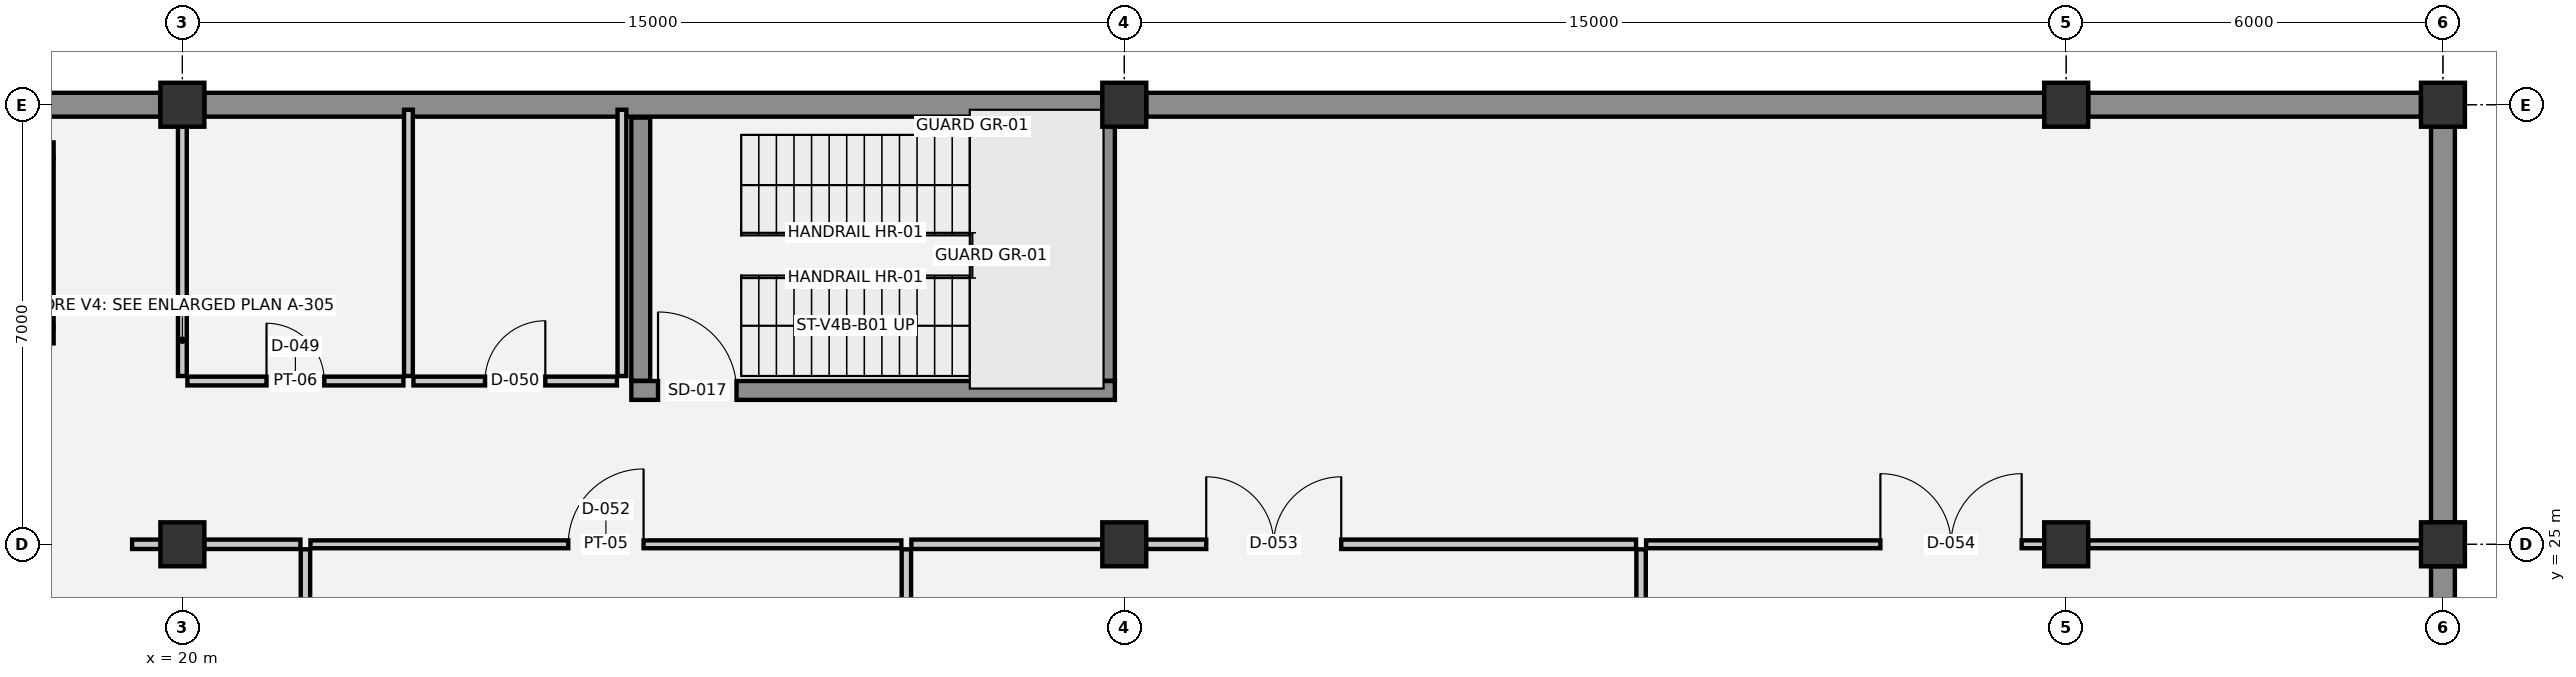
"""IFC4 building model, lengths in metres.
Left out: names, types, materials, properties, quantities, classifications, styles, units other than length and angle.
Written with IfcOpenShell. Run it as: python <this file> out.ifc"""

import sys

from ifc_helpers import new_model, si_unit, direction, frame, frame_2d, origin, origin_2d, place, context, subcontext, project, spatial, rectangle, extrude, element, fill, save


model = new_model("IFC4")
c1 = context("Model", 3, precision=1e-05, world=origin(), true_north=direction((0.0, 1.0)))
c2 = subcontext(c1, "Body", "Model", "MODEL_VIEW")
j1 = project(units=[si_unit("LENGTHUNIT", "METRE"), si_unit("PLANEANGLEUNIT", "RADIAN")], contexts=[c1])
p1 = place(None, origin())
s1 = spatial("IfcSite", under=j1, at=p1, CompositionType="ELEMENT")
p2 = place(p1, origin())
s2 = spatial("IfcBuilding", under=s1, at=p2, CompositionType="ELEMENT")
p3 = place(p2, frame((0.0, 0.0, -4.5)))
s3 = spatial("IfcBuildingStorey", under=s2, at=p3, CompositionType="ELEMENT", Elevation=-4.5)
for number, where, z_axis, x_axis in (
    (1, (20.0, 25.0, 0.0), (0.0, 0.0, 1.0), (1.0, 0.0, 0.0)),
    (2, (20.0, 32.0, 0.0), (0.0, 0.0, 1.0), (1.0, 0.0, 0.0)),
    (3, (35.0, 25.0, 0.0), (0.0, 0.0, 1.0), (1.0, 0.0, 0.0)),
    (4, (35.0, 32.0, 0.0), (0.0, 0.0, 1.0), (1.0, 0.0, 0.0)),
    (5, (50.0, 25.0, 0.0), (0.0, 0.0, 1.0), (1.0, 0.0, 0.0)),
    (6, (50.0, 32.0, 0.0), (0.0, 0.0, 1.0), (1.0, 0.0, 0.0)),
    (7, (56.0, 25.0, 0.0), (0.0, 0.0, 1.0), (1.0, 0.0, 0.0)),
    (8, (56.0, 32.0, 0.0), (0.0, 0.0, 1.0), (1.0, 0.0, 0.0)),
):
    element("IfcColumn", number, at=place(p3, frame(where, z_axis=z_axis, x_axis=x_axis)), inside=s3, PredefinedType="COLUMN", context=c2, shape_type="SweptSolid", body=[
        extrude(rectangle(XDim=0.7, YDim=0.7, at=origin_2d()), origin(), (0.0, 0.0, 1.0), 4.5),
    ])
p4 = place(p3, frame((14.85, 32.0, 0.0), z_axis=(0.0, 0.0, 1.0), x_axis=(1.0, 0.0, 0.0)))
e9 = element("IfcWall", 9, at=p4, inside=s3, PredefinedType="STANDARD", context=c2, shape_type="SweptSolid", body=[
    extrude(rectangle(XDim=4.8, YDim=0.38, at=frame_2d((2.4, 0.0))), origin(), (0.0, 0.0, 1.0), 4.24),
])
for number, where, z_axis, x_axis in (
    (10, (20.35, 32.0, 0.0), (0.0, 0.0, 1.0), (1.0, 0.0, 0.0)),
    (11, (35.35, 32.0, 0.0), (0.0, 0.0, 1.0), (1.0, 0.0, 0.0)),
):
    element("IfcWall", number, at=place(p3, frame(where, z_axis=z_axis, x_axis=x_axis)), inside=s3, PredefinedType="STANDARD", context=c2, shape_type="SweptSolid", body=[
        extrude(rectangle(XDim=14.3, YDim=0.38, at=frame_2d((7.15, 0.0))), origin(), (0.0, 0.0, 1.0), 4.24),
    ])
p5 = place(p3, frame((50.35, 32.0, 0.0), z_axis=(0.0, 0.0, 1.0), x_axis=(1.0, 0.0, 0.0)))
e12 = element("IfcWall", 12, at=p5, inside=s3, PredefinedType="STANDARD", context=c2, shape_type="SweptSolid", body=[
    extrude(rectangle(XDim=5.3, YDim=0.38, at=frame_2d((2.65, 0.0))), origin(), (0.0, 0.0, 1.0), 4.24),
])
p6 = place(p3, frame((56.0, 31.65, 0.0), z_axis=(0.0, 0.0, 1.0), x_axis=(0.0, -1.0, 0.0)))
e13 = element("IfcWall", 13, at=p6, inside=s3, PredefinedType="STANDARD", context=c2, shape_type="SweptSolid", body=[
    extrude(rectangle(XDim=6.3, YDim=0.38, at=frame_2d((3.15, 0.0))), origin(), (0.0, 0.0, 1.0), 4.24),
])
p7 = place(p3, frame((56.0, 24.65, 0.0), z_axis=(0.0, 0.0, 1.0), x_axis=(0.0, -1.0, 0.0)))
e14 = element("IfcWall", 14, at=p7, inside=s3, PredefinedType="STANDARD", context=c2, shape_type="SweptSolid", body=[
    extrude(rectangle(XDim=7.3, YDim=0.38, at=frame_2d((3.65, 0.0))), origin(), (0.0, 0.0, 1.0), 4.24),
])
p8 = place(p3, frame((15.05, 28.325, 0.0), z_axis=(0.0, 0.0, 1.0), x_axis=(1.0, 0.0, 0.0)))
e15 = element("IfcWall", 15, at=p8, inside=s3, PredefinedType="SHEAR", context=c2, shape_type="SweptSolid", body=[
    extrude(rectangle(XDim=2.9, YDim=0.25, at=frame_2d((1.45, 0.0))), origin(), (0.0, 0.0, 1.0), 4.5),
])
p9 = place(p8, frame((0.9, 0.0, 0.0)))
e16 = element("IfcOpeningElement", 16, at=p9, cuts=e15, PredefinedType="OPENING", context=c2, shape_type="SweptSolid", body=[
    extrude(rectangle(XDim=1.1, YDim=2.15, at=frame_2d((0.55, 1.075))), frame((0.0, 0.135, 0.0), z_axis=(0.0, -1.0, 0.0), x_axis=(1.0, 0.0, 0.0)), (0.0, 0.0, 1.0), 0.27),
])
p10 = place(p3, frame((17.95, 31.275, 0.0), z_axis=(0.0, 0.0, 1.0), x_axis=(-1.0, 0.0, 0.0)))
e17 = element("IfcWall", 17, at=p10, inside=s3, PredefinedType="SHEAR", context=c2, shape_type="SweptSolid", body=[
    extrude(rectangle(XDim=2.9, YDim=0.25, at=frame_2d((1.45, 0.0))), origin(), (0.0, 0.0, 1.0), 4.5),
])
p11 = place(p3, frame((17.825, 28.455, 0.0), z_axis=(0.0, 0.0, 1.0), x_axis=(0.0, 1.0, 0.0)))
e18 = element("IfcWall", 18, at=p11, inside=s3, PredefinedType="SHEAR", context=c2, shape_type="SweptSolid", body=[
    extrude(rectangle(XDim=2.69, YDim=0.25, at=frame_2d((1.345, 0.0))), origin(), (0.0, 0.0, 1.0), 4.5),
])
p12 = place(p3, frame((27.15, 27.45, 0.0), z_axis=(0.0, 0.0, 1.0), x_axis=(1.0, 0.0, 0.0)))
e19 = element("IfcWall", 19, at=p12, inside=s3, PredefinedType="SHEAR", context=c2, shape_type="SweptSolid", body=[
    extrude(rectangle(XDim=7.7, YDim=0.3, at=frame_2d((3.85, 0.0))), origin(), (0.0, 0.0, 1.0), 4.24),
])
p13 = place(p12, frame((0.425, 0.0, 0.0)))
e20 = element("IfcOpeningElement", 20, at=p13, cuts=e19, PredefinedType="OPENING", context=c2, shape_type="SweptSolid", body=[
    extrude(rectangle(XDim=1.25, YDim=2.15, at=frame_2d((0.625, 1.075))), frame((0.0, 0.16, 0.0), z_axis=(0.0, -1.0, 0.0), x_axis=(1.0, 0.0, 0.0)), (0.0, 0.0, 1.0), 0.32),
])
for number, where, z_axis, x_axis in (
    (21, (27.3, 31.795, 0.0), (0.0, 0.0, 1.0), (0.0, -1.0, 0.0)),
    (22, (34.7, 27.605, 0.0), (0.0, 0.0, 1.0), (0.0, 1.0, 0.0)),
):
    element("IfcWall", number, at=place(p3, frame(where, z_axis=z_axis, x_axis=x_axis)), inside=s3, PredefinedType="SHEAR", context=c2, shape_type="SweptSolid", body=[
        extrude(rectangle(XDim=4.19, YDim=0.3, at=frame_2d((2.095, 0.0))), origin(), (0.0, 0.0, 1.0), 4.24),
    ])
p14 = place(p3, frame((19.2, 25.0, 0.0), z_axis=(0.0, 0.0, 1.0), x_axis=(1.0, 0.0, 0.0)))
e23 = element("IfcWall", 23, at=p14, inside=s3, PredefinedType="PARTITIONING", context=c2, shape_type="SweptSolid", body=[
    extrude(rectangle(XDim=1.15, YDim=0.15, at=frame_2d((0.575, 0.0))), origin(), (0.0, 0.0, 1.0), 4.14),
])
p15 = place(p3, frame((20.35, 25.0, 0.0), z_axis=(0.0, 0.0, 1.0), x_axis=(1.0, 0.0, 0.0)))
e24 = element("IfcWall", 24, at=p15, inside=s3, PredefinedType="PARTITIONING", context=c2, shape_type="SweptSolid", body=[
    extrude(rectangle(XDim=1.53, YDim=0.15, at=frame_2d((0.765, 0.0))), origin(), (0.0, 0.0, 1.0), 3.28),
])
p16 = place(p3, frame((22.04, 25.0, 0.0), z_axis=(0.0, 0.0, 1.0), x_axis=(1.0, 0.0, 0.0)))
e25 = element("IfcWall", 25, at=p16, inside=s3, PredefinedType="PARTITIONING", context=c2, shape_type="SweptSolid", body=[
    extrude(rectangle(XDim=9.41, YDim=0.125, at=frame_2d((4.705, 0.0))), origin(), (0.0, 0.0, 1.0), 3.28),
])
p17 = place(p16, frame((4.105, 0.0, 0.0)))
e26 = element("IfcOpeningElement", 26, at=p17, cuts=e25, PredefinedType="OPENING", context=c2, shape_type="SweptSolid", body=[
    extrude(rectangle(XDim=1.2, YDim=2.15, at=frame_2d((0.6, 1.075))), frame((0.0, 0.073, 0.0), z_axis=(0.0, -1.0, 0.0), x_axis=(1.0, 0.0, 0.0)), (0.0, 0.0, 1.0), 0.145),
])
p18 = place(p3, frame((31.61, 25.0, 0.0), z_axis=(0.0, 0.0, 1.0), x_axis=(1.0, 0.0, 0.0)))
e27 = element("IfcWall", 27, at=p18, inside=s3, PredefinedType="PARTITIONING", context=c2, shape_type="SweptSolid", body=[
    extrude(rectangle(XDim=11.54, YDim=0.15, at=frame_2d((5.77, 0.0))), origin(), (0.0, 0.0, 1.0), 3.28),
])
p19 = place(p18, frame((4.695, 0.0, 0.0)))
e28 = element("IfcOpeningElement", 28, at=p19, cuts=e27, PredefinedType="OPENING", context=c2, shape_type="SweptSolid", body=[
    extrude(rectangle(XDim=2.15, YDim=2.4, at=frame_2d((1.075, 1.2))), frame((0.0, 0.085, 0.0), z_axis=(0.0, -1.0, 0.0), x_axis=(1.0, 0.0, 0.0)), (0.0, 0.0, 1.0), 0.17),
])
p20 = place(p3, frame((43.31, 25.0, 0.0), z_axis=(0.0, 0.0, 1.0), x_axis=(1.0, 0.0, 0.0)))
e29 = element("IfcWall", 29, at=p20, inside=s3, PredefinedType="PARTITIONING", context=c2, shape_type="SweptSolid", body=[
    extrude(rectangle(XDim=7.04, YDim=0.125, at=frame_2d((3.52, 0.0))), origin(), (0.0, 0.0, 1.0), 3.28),
])
p21 = place(p20, frame((3.731, 0.0, 0.0)))
e30 = element("IfcOpeningElement", 30, at=p21, cuts=e29, PredefinedType="OPENING", context=c2, shape_type="SweptSolid", body=[
    extrude(rectangle(XDim=2.25, YDim=2.4, at=frame_2d((1.125, 1.2))), frame((0.0, 0.073, 0.0), z_axis=(0.0, -1.0, 0.0), x_axis=(1.0, 0.0, 0.0)), (0.0, 0.0, 1.0), 0.145),
])
p22 = place(p3, frame((50.35, 25.0, 0.0), z_axis=(0.0, 0.0, 1.0), x_axis=(1.0, 0.0, 0.0)))
e31 = element("IfcWall", 31, at=p22, inside=s3, PredefinedType="PARTITIONING", context=c2, shape_type="SweptSolid", body=[
    extrude(rectangle(XDim=5.57, YDim=0.125, at=frame_2d((2.785, 0.0))), origin(), (0.0, 0.0, 1.0), 3.53),
])
p23 = place(p3, frame((20.08, 27.6, 0.0), z_axis=(0.0, 0.0, 1.0), x_axis=(1.0, 0.0, 0.0)))
e32 = element("IfcWall", 32, at=p23, inside=s3, PredefinedType="PLUMBINGWALL", context=c2, shape_type="SweptSolid", body=[
    extrude(rectangle(XDim=3.44, YDim=0.14, at=frame_2d((1.72, 0.0))), origin(), (0.0, 0.0, 1.0), 4.14),
])
p24 = place(p23, frame((1.26, 0.0, 0.0)))
e33 = element("IfcOpeningElement", 33, at=p24, cuts=e32, PredefinedType="OPENING", context=c2, shape_type="SweptSolid", body=[
    extrude(rectangle(XDim=0.92, YDim=2.1, at=frame_2d((0.46, 1.05))), frame((0.0, 0.08, 0.0), z_axis=(0.0, -1.0, 0.0), x_axis=(1.0, 0.0, 0.0)), (0.0, 0.0, 1.0), 0.16),
])
p25 = place(p3, frame((23.68, 27.6, 0.0), z_axis=(0.0, 0.0, 1.0), x_axis=(1.0, 0.0, 0.0)))
e34 = element("IfcWall", 34, at=p25, inside=s3, PredefinedType="PLUMBINGWALL", context=c2, shape_type="SweptSolid", body=[
    extrude(rectangle(XDim=3.24, YDim=0.14, at=frame_2d((1.62, 0.0))), origin(), (0.0, 0.0, 1.0), 4.14),
])
p26 = place(p25, frame((1.14, 0.0, 0.0)))
e35 = element("IfcOpeningElement", 35, at=p26, cuts=e34, PredefinedType="OPENING", context=c2, shape_type="SweptSolid", body=[
    extrude(rectangle(XDim=0.96, YDim=2.1, at=frame_2d((0.48, 1.05))), frame((0.0, 0.08, 0.0), z_axis=(0.0, -1.0, 0.0), x_axis=(1.0, 0.0, 0.0)), (0.0, 0.0, 1.0), 0.16),
])
p27 = place(p3, frame((20.0, 27.68, 0.0), z_axis=(0.0, 0.0, 1.0), x_axis=(0.0, 1.0, 0.0)))
e36 = element("IfcWall", 36, at=p27, inside=s3, PredefinedType="PLUMBINGWALL", context=c2, shape_type="SweptSolid", body=[
    extrude(rectangle(XDim=4.24, YDim=0.14, at=frame_2d((2.12, 0.0))), origin(), (0.0, 0.0, 1.0), 3.68),
])
p28 = place(p3, frame((21.96, 4.08, 0.0), z_axis=(0.0, 0.0, 1.0), x_axis=(0.0, 1.0, 0.0)))
e37 = element("IfcWall", 37, at=p28, inside=s3, PredefinedType="PARTITIONING", context=c2, shape_type="SweptSolid", body=[
    extrude(rectangle(XDim=20.84, YDim=0.15, at=frame_2d((10.42, 0.0))), origin(), (0.0, 0.0, 1.0), 4.14),
])
for number, where, z_axis, x_axis in (
    (38, (23.6, 27.68, 0.0), (0.0, 0.0, 1.0), (0.0, 1.0, 0.0)),
    (39, (27.0, 27.68, 0.0), (0.0, 0.0, 1.0), (0.0, 1.0, 0.0)),
):
    element("IfcWall", number, at=place(p3, frame(where, z_axis=z_axis, x_axis=x_axis)), inside=s3, PredefinedType="PLUMBINGWALL", context=c2, shape_type="SweptSolid", body=[
        extrude(rectangle(XDim=4.24, YDim=0.14, at=frame_2d((2.12, 0.0))), origin(), (0.0, 0.0, 1.0), 4.14),
    ])
for number, where, z_axis, x_axis in (
    (40, (31.53, 4.08, 0.0), (0.0, 0.0, 1.0), (0.0, 1.0, 0.0)),
    (41, (43.23, 4.08, 0.0), (0.0, 0.0, 1.0), (0.0, 1.0, 0.0)),
):
    element("IfcWall", number, at=place(p3, frame(where, z_axis=z_axis, x_axis=x_axis)), inside=s3, PredefinedType="PARTITIONING", context=c2, shape_type="SweptSolid", body=[
        extrude(rectangle(XDim=20.84, YDim=0.15, at=frame_2d((10.42, 0.0))), origin(), (0.0, 0.0, 1.0), 4.14),
    ])
p29 = place(p13, origin())
e42 = element("IfcDoor", 42, at=p29, inside=s3, OperationType="SINGLE_SWING_LEFT", PredefinedType="DOOR", context=c2, shape_type="SweptSolid", body=[
    extrude(rectangle(XDim=1.25, YDim=2.15, at=frame_2d((0.625, 1.075))), frame((0.0, 0.025, 0.0), z_axis=(0.0, -1.0, 0.0), x_axis=(1.0, 0.0, 0.0)), (0.0, 0.0, 1.0), 0.05),
])
fill(e20, e42)
p30 = place(p24, origin())
e43 = element("IfcDoor", 43, at=p30, inside=s3, OperationType="SINGLE_SWING_LEFT", PredefinedType="DOOR", context=c2, shape_type="SweptSolid", body=[
    extrude(rectangle(XDim=0.92, YDim=2.1, at=frame_2d((0.46, 1.05))), frame((0.0, 0.025, 0.0), z_axis=(0.0, -1.0, 0.0), x_axis=(1.0, 0.0, 0.0)), (0.0, 0.0, 1.0), 0.05),
])
fill(e33, e43)
p31 = place(p26, origin())
e44 = element("IfcDoor", 44, at=p31, inside=s3, OperationType="SINGLE_SWING_RIGHT", PredefinedType="DOOR", context=c2, shape_type="SweptSolid", body=[
    extrude(rectangle(XDim=0.96, YDim=2.1, at=frame_2d((0.48, 1.05))), frame((0.0, 0.025, 0.0), z_axis=(0.0, -1.0, 0.0), x_axis=(1.0, 0.0, 0.0)), (0.0, 0.0, 1.0), 0.05),
])
fill(e35, e44)
p32 = place(p17, origin())
e45 = element("IfcDoor", 45, at=p32, inside=s3, OperationType="SINGLE_SWING_RIGHT", PredefinedType="DOOR", context=c2, shape_type="SweptSolid", body=[
    extrude(rectangle(XDim=1.2, YDim=2.15, at=frame_2d((0.6, 1.075))), frame((0.0, 0.025, 0.0), z_axis=(0.0, -1.0, 0.0), x_axis=(1.0, 0.0, 0.0)), (0.0, 0.0, 1.0), 0.05),
])
fill(e26, e45)
p33 = place(p19, origin())
e46 = element("IfcDoor", 46, at=p33, inside=s3, OperationType="DOUBLE_DOOR_SINGLE_SWING", PredefinedType="DOOR", context=c2, shape_type="SweptSolid", body=[
    extrude(rectangle(XDim=2.15, YDim=2.4, at=frame_2d((1.075, 1.2))), frame((0.0, 0.025, 0.0), z_axis=(0.0, -1.0, 0.0), x_axis=(1.0, 0.0, 0.0)), (0.0, 0.0, 1.0), 0.05),
])
fill(e28, e46)
p34 = place(p21, origin())
e47 = element("IfcDoor", 47, at=p34, inside=s3, OperationType="DOUBLE_DOOR_SINGLE_SWING", PredefinedType="DOOR", context=c2, shape_type="SweptSolid", body=[
    extrude(rectangle(XDim=2.25, YDim=2.4, at=frame_2d((1.125, 1.2))), frame((0.0, 0.025, 0.0), z_axis=(0.0, -1.0, 0.0), x_axis=(1.0, 0.0, 0.0)), (0.0, 0.0, 1.0), 0.05),
])
fill(e30, e47)
save(model, sys.argv[1])
